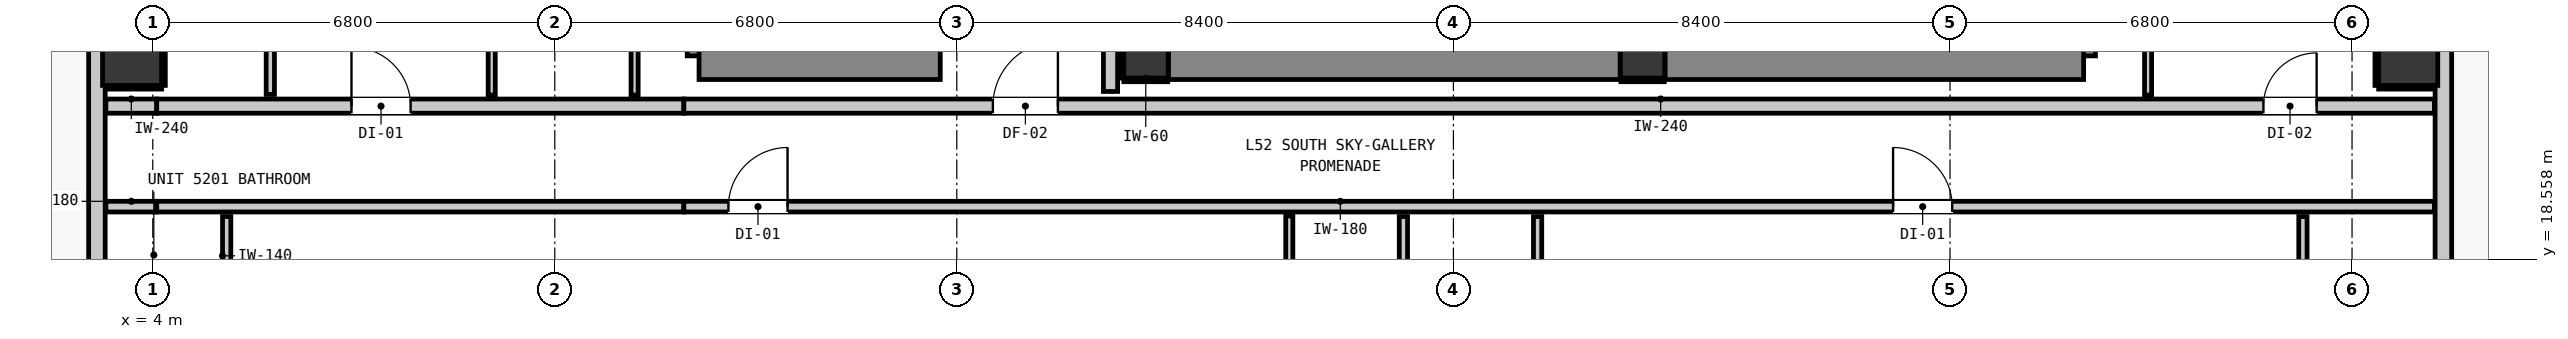
"""IFC4 building model, lengths in metres.
Left out: names, types, materials, properties, quantities, classifications, styles, units other than length and angle.
Written with IfcOpenShell. Run it as: python <this file> out.ifc"""

import sys

from ifc_helpers import new_model, si_unit, direction, frame, frame_2d, origin, origin_2d, place, context, subcontext, project, spatial, rectangle, extrude, element, fill, save


model = new_model("IFC4")
c1 = context("Model", 3, precision=1e-05, world=origin(), true_north=direction((0.0, 1.0)))
c2 = subcontext(c1, "Body", "Model", "MODEL_VIEW")
j1 = project(units=[si_unit("LENGTHUNIT", "METRE"), si_unit("PLANEANGLEUNIT", "RADIAN")], contexts=[c1])
p1 = place(None, origin())
s1 = spatial("IfcSite", under=j1, at=p1, CompositionType="ELEMENT")
p2 = place(p1, origin())
s2 = spatial("IfcBuilding", under=s1, at=p2, CompositionType="ELEMENT")
p3 = place(p2, frame((0.0, 0.0, 180.2)))
s3 = spatial("IfcBuildingStorey", under=s2, at=p3, CompositionType="ELEMENT", Elevation=180.2)
for number, where, z_axis, x_axis in (
    (1, (20.8, 22.0, 0.0), (0.0, 0.0, 1.0), (1.0, 0.0, 0.0)),
    (2, (29.2, 22.0, 0.0), (0.0, 0.0, 1.0), (1.0, 0.0, 0.0)),
):
    element("IfcColumn", number, at=place(p3, frame(where, z_axis=z_axis, x_axis=x_axis)), inside=s3, PredefinedType="COLUMN", context=c2, shape_type="SweptSolid", body=[
        extrude(rectangle(XDim=0.75, YDim=0.75, at=origin_2d()), origin(), (0.0, 0.0, 1.0), 3.32),
    ])
p4 = place(p3, frame((13.44, 22.0, 0.0), z_axis=(0.0, 0.0, 1.0), x_axis=(0.0, 1.0, 0.0)))
e3 = element("IfcWall", 3, at=p4, inside=s3, PredefinedType="SHEAR", context=c2, shape_type="SweptSolid", body=[
    extrude(rectangle(XDim=8.32, YDim=0.8, at=frame_2d((4.16, 0.0))), origin(), (0.0, 0.0, 1.0), 3.32),
])
p5 = place(p3, frame((13.24, 22.0, 0.0), z_axis=(0.0, 0.0, 1.0), x_axis=(1.0, 0.0, 0.0)))
e4 = element("IfcWall", 4, at=p5, inside=s3, PredefinedType="SHEAR", context=c2, shape_type="SweptSolid", body=[
    extrude(rectangle(XDim=4.08, YDim=0.8, at=frame_2d((2.04, 0.0))), origin(), (0.0, 0.0, 1.0), 3.32),
])
p6 = place(p3, frame((36.46, 22.0, 0.0), z_axis=(0.0, 0.0, 1.0), x_axis=(0.0, 1.0, 0.0)))
e5 = element("IfcWall", 5, at=p6, inside=s3, PredefinedType="SHEAR", context=c2, shape_type="SweptSolid", body=[
    extrude(rectangle(XDim=8.32, YDim=0.8, at=frame_2d((4.16, 0.0))), origin(), (0.0, 0.0, 1.0), 3.32),
])
p7 = place(p3, frame((29.58, 22.0, 0.0), z_axis=(0.0, 0.0, 1.0), x_axis=(1.0, 0.0, 0.0)))
e6 = element("IfcWall", 6, at=p7, inside=s3, PredefinedType="SHEAR", context=c2, shape_type="SweptSolid", body=[
    extrude(rectangle(XDim=7.08, YDim=0.8, at=frame_2d((3.54, 0.0))), origin(), (0.0, 0.0, 1.0), 3.32),
])
p8 = place(p3, frame((21.18, 22.0, 0.0), z_axis=(0.0, 0.0, 1.0), x_axis=(1.0, 0.0, 0.0)))
e7 = element("IfcWall", 7, at=p8, inside=s3, PredefinedType="SHEAR", context=c2, shape_type="SweptSolid", body=[
    extrude(rectangle(XDim=7.64, YDim=0.8, at=frame_2d((3.82, 0.0))), origin(), (0.0, 0.0, 1.0), 3.32),
])
for number, where, z_axis, x_axis in (
    (8, (3.65, 22.0, 0.0), (0.0, 0.0, 1.0), (1.0, 0.0, 0.0)),
    (9, (42.15, 22.0, 0.0), (0.0, 0.0, 1.0), (1.0, 0.0, 0.0)),
):
    element("IfcColumn", number, at=place(p3, frame(where, z_axis=z_axis, x_axis=x_axis)), inside=s3, PredefinedType="COLUMN", context=c2, shape_type="SweptSolid", body=[
        extrude(rectangle(XDim=1.0, YDim=1.0, at=origin_2d()), origin(), (0.0, 0.0, 1.0), 3.32),
    ])
p9 = place(p3, frame((3.055, 17.555, 0.0), z_axis=(0.0, 0.0, 1.0), x_axis=(0.0, 1.0, 0.0)))
e10 = element("IfcWall", 10, at=p9, inside=s3, PredefinedType="STANDARD", context=c2, shape_type="SweptSolid", body=[
    extrude(rectangle(XDim=32.29, YDim=0.28, at=frame_2d((16.145, 0.0))), origin(), (0.0, 0.0, 1.0), 3.08),
])
p10 = place(p9, frame((8.625, 0.0, 0.0)))
e11 = element("IfcOpeningElement", 11, at=p10, cuts=e10, PredefinedType="OPENING", context=c2, shape_type="SweptSolid", body=[
    extrude(rectangle(XDim=1.0, YDim=2.15, at=frame_2d((0.5, 1.075))), frame((0.0, 0.15, 0.0), z_axis=(0.0, -1.0, 0.0), x_axis=(1.0, 0.0, 0.0)), (0.0, 0.0, 1.0), 0.3),
])
p11 = place(p9, frame((30.322, 0.0, 0.85)))
e12 = element("IfcOpeningElement", 12, at=p11, cuts=e10, PredefinedType="OPENING", context=c2, shape_type="SweptSolid", body=[
    extrude(rectangle(XDim=0.9, YDim=1.5, at=frame_2d((0.45, 0.75))), frame((0.0, 0.15, 0.0), z_axis=(0.0, -1.0, 0.0), x_axis=(1.0, 0.0, 0.0)), (0.0, 0.0, 1.0), 0.3),
])
p12 = place(p9, frame((10.785, 0.0, 0.85)))
e13 = element("IfcOpeningElement", 13, at=p12, cuts=e10, PredefinedType="OPENING", context=c2, shape_type="SweptSolid", body=[
    extrude(rectangle(XDim=0.9, YDim=1.5, at=frame_2d((0.45, 0.75))), frame((0.0, 0.15, 0.0), z_axis=(0.0, -1.0, 0.0), x_axis=(1.0, 0.0, 0.0)), (0.0, 0.0, 1.0), 0.3),
])
p13 = place(p9, frame((17.045, 0.0, 0.85)))
e14 = element("IfcOpeningElement", 14, at=p13, cuts=e10, PredefinedType="OPENING", context=c2, shape_type="SweptSolid", body=[
    extrude(rectangle(XDim=0.9, YDim=1.5, at=frame_2d((0.45, 0.75))), frame((0.0, 0.15, 0.0), z_axis=(0.0, -1.0, 0.0), x_axis=(1.0, 0.0, 0.0)), (0.0, 0.0, 1.0), 0.3),
])
p14 = place(p3, frame((42.745, 49.845, 0.0), z_axis=(0.0, 0.0, 1.0), x_axis=(0.0, -1.0, 0.0)))
e15 = element("IfcWall", 15, at=p14, inside=s3, PredefinedType="STANDARD", context=c2, shape_type="SweptSolid", body=[
    extrude(rectangle(XDim=32.29, YDim=0.28, at=frame_2d((16.145, 0.0))), origin(), (0.0, 0.0, 1.0), 3.08),
])
p15 = place(p14, frame((0.904, 0.0, 0.0)))
e16 = element("IfcOpeningElement", 16, at=p15, cuts=e15, PredefinedType="OPENING", context=c2, shape_type="SweptSolid", body=[
    extrude(rectangle(XDim=1.0, YDim=2.15, at=frame_2d((0.5, 1.075))), frame((0.0, 0.15, 0.0), z_axis=(0.0, -1.0, 0.0), x_axis=(1.0, 0.0, 0.0)), (0.0, 0.0, 1.0), 0.3),
])
p16 = place(p14, frame((5.02, 0.0, 0.85)))
e17 = element("IfcOpeningElement", 17, at=p16, cuts=e15, PredefinedType="OPENING", context=c2, shape_type="SweptSolid", body=[
    extrude(rectangle(XDim=0.9, YDim=1.5, at=frame_2d((0.45, 0.75))), frame((0.0, 0.15, 0.0), z_axis=(0.0, -1.0, 0.0), x_axis=(1.0, 0.0, 0.0)), (0.0, 0.0, 1.0), 0.3),
])
p17 = place(p14, frame((23.045, 0.0, 0.85)))
e18 = element("IfcOpeningElement", 18, at=p17, cuts=e15, PredefinedType="OPENING", context=c2, shape_type="SweptSolid", body=[
    extrude(rectangle(XDim=0.9, YDim=1.5, at=frame_2d((0.45, 0.75))), frame((0.0, 0.15, 0.0), z_axis=(0.0, -1.0, 0.0), x_axis=(1.0, 0.0, 0.0)), (0.0, 0.0, 1.0), 0.3),
])
p18 = place(p14, frame((12.253, 0.0, 0.85)))
e19 = element("IfcOpeningElement", 19, at=p18, cuts=e15, PredefinedType="OPENING", context=c2, shape_type="SweptSolid", body=[
    extrude(rectangle(XDim=0.9, YDim=1.5, at=frame_2d((0.45, 0.75))), frame((0.0, 0.15, 0.0), z_axis=(0.0, -1.0, 0.0), x_axis=(1.0, 0.0, 0.0)), (0.0, 0.0, 1.0), 0.3),
])
p19 = place(p3, frame((3.207, 21.15, 0.0), z_axis=(0.0, 0.0, 1.0), x_axis=(1.0, 0.0, 0.0)))
e20 = element("IfcWall", 20, at=p19, inside=s3, PredefinedType="PARTITIONING", context=c2, shape_type="SweptSolid", body=[
    extrude(rectangle(XDim=0.86, YDim=0.24, at=frame_2d((0.43, 0.0))), origin(), (0.0, 0.0, 1.0), 3.08),
])
p20 = place(p3, frame((4.067, 21.15, 0.0), z_axis=(0.0, 0.0, 1.0), x_axis=(1.0, 0.0, 0.0)))
e21 = element("IfcWall", 21, at=p20, inside=s3, PredefinedType="PARTITIONING", context=c2, shape_type="SweptSolid", body=[
    extrude(rectangle(XDim=8.916, YDim=0.24, at=frame_2d((4.458, 0.0))), origin(), (0.0, 0.0, 1.0), 2.565),
])
p21 = place(p20, frame((3.294, 0.0, 0.0)))
e22 = element("IfcOpeningElement", 22, at=p21, cuts=e21, PredefinedType="OPENING", context=c2, shape_type="SweptSolid", body=[
    extrude(rectangle(XDim=1.0, YDim=2.15, at=frame_2d((0.5, 1.075))), frame((0.0, 0.13, 0.0), z_axis=(0.0, -1.0, 0.0), x_axis=(1.0, 0.0, 0.0)), (0.0, 0.0, 1.0), 0.26),
])
p22 = place(p3, frame((12.983, 21.15, 0.0), z_axis=(0.0, 0.0, 1.0), x_axis=(1.0, 0.0, 0.0)))
e23 = element("IfcWall", 23, at=p22, inside=s3, PredefinedType="PARTITIONING", context=c2, shape_type="SweptSolid", body=[
    extrude(rectangle(XDim=29.61, YDim=0.24, at=frame_2d((14.805, 0.0))), origin(), (0.0, 0.0, 1.0), 3.08),
])
p23 = place(p22, frame((5.227, 0.0, 0.0)))
e24 = element("IfcOpeningElement", 24, at=p23, cuts=e23, PredefinedType="OPENING", context=c2, shape_type="SweptSolid", body=[
    extrude(rectangle(XDim=1.1, YDim=2.15, at=frame_2d((0.55, 1.075))), frame((0.0, 0.13, 0.0), z_axis=(0.0, -1.0, 0.0), x_axis=(1.0, 0.0, 0.0)), (0.0, 0.0, 1.0), 0.26),
])
p24 = place(p22, frame((26.718, 0.0, 0.0)))
e25 = element("IfcOpeningElement", 25, at=p24, cuts=e23, PredefinedType="OPENING", context=c2, shape_type="SweptSolid", body=[
    extrude(rectangle(XDim=0.9, YDim=2.1, at=frame_2d((0.45, 1.05))), frame((0.0, 0.13, 0.0), z_axis=(0.0, -1.0, 0.0), x_axis=(1.0, 0.0, 0.0)), (0.0, 0.0, 1.0), 0.26),
])
p25 = place(p3, frame((3.207, 19.45, 0.0), z_axis=(0.0, 0.0, 1.0), x_axis=(1.0, 0.0, 0.0)))
e26 = element("IfcWall", 26, at=p25, inside=s3, PredefinedType="PARTITIONING", context=c2, shape_type="SweptSolid", body=[
    extrude(rectangle(XDim=0.86, YDim=0.18, at=frame_2d((0.43, 0.0))), origin(), (0.0, 0.0, 1.0), 3.08),
])
p26 = place(p3, frame((4.067, 19.45, 0.0), z_axis=(0.0, 0.0, 1.0), x_axis=(1.0, 0.0, 0.0)))
e27 = element("IfcWall", 27, at=p26, inside=s3, PredefinedType="PARTITIONING", context=c2, shape_type="SweptSolid", body=[
    extrude(rectangle(XDim=8.916, YDim=0.18, at=frame_2d((4.458, 0.0))), origin(), (0.0, 0.0, 1.0), 2.565),
])
p27 = place(p3, frame((12.983, 19.45, 0.0), z_axis=(0.0, 0.0, 1.0), x_axis=(1.0, 0.0, 0.0)))
e28 = element("IfcWall", 28, at=p27, inside=s3, PredefinedType="PARTITIONING", context=c2, shape_type="SweptSolid", body=[
    extrude(rectangle(XDim=29.61, YDim=0.18, at=frame_2d((14.805, 0.0))), origin(), (0.0, 0.0, 1.0), 3.08),
])
p28 = place(p27, frame((0.754, 0.0, 0.0)))
e29 = element("IfcOpeningElement", 29, at=p28, cuts=e28, PredefinedType="OPENING", context=c2, shape_type="SweptSolid", body=[
    extrude(rectangle(XDim=1.0, YDim=2.15, at=frame_2d((0.5, 1.075))), frame((0.0, 0.1, 0.0), z_axis=(0.0, -1.0, 0.0), x_axis=(1.0, 0.0, 0.0)), (0.0, 0.0, 1.0), 0.2),
])
p29 = place(p27, frame((20.454, 0.0, 0.0)))
e30 = element("IfcOpeningElement", 30, at=p29, cuts=e28, PredefinedType="OPENING", context=c2, shape_type="SweptSolid", body=[
    extrude(rectangle(XDim=1.0, YDim=2.15, at=frame_2d((0.5, 1.075))), frame((0.0, 0.1, 0.0), z_axis=(0.0, -1.0, 0.0), x_axis=(1.0, 0.0, 0.0)), (0.0, 0.0, 1.0), 0.2),
])
p30 = place(p3, frame((20.2, 21.398, 0.0), z_axis=(0.0, 0.0, 1.0), x_axis=(0.0, 1.0, 0.0)))
e31 = element("IfcWall", 31, at=p30, inside=s3, PredefinedType="PARTITIONING", context=c2, shape_type="SweptSolid", body=[
    extrude(rectangle(XDim=6.754, YDim=0.24, at=frame_2d((3.377, 0.0))), origin(), (0.0, 0.0, 1.0), 3.08),
])
p31 = place(p3, frame((5.25, 15.575, 0.0), z_axis=(0.0, 0.0, 1.0), x_axis=(0.0, 1.0, 0.0)))
e32 = element("IfcWall", 32, at=p31, inside=s3, PredefinedType="PARTITIONING", context=c2, shape_type="SweptSolid", body=[
    extrude(rectangle(XDim=3.707, YDim=0.14, at=frame_2d((1.854, 0.0))), origin(), (0.0, 0.0, 1.0), 3.08),
])
p32 = place(p31, frame((1.42, 0.0, 0.0)))
e33 = element("IfcOpeningElement", 33, at=p32, cuts=e32, PredefinedType="OPENING", context=c2, shape_type="SweptSolid", body=[
    extrude(rectangle(XDim=0.86, YDim=2.02, at=frame_2d((0.43, 1.01))), frame((0.0, 0.08, 0.0), z_axis=(0.0, -1.0, 0.0), x_axis=(1.0, 0.0, 0.0)), (0.0, 0.0, 1.0), 0.16),
])
p33 = place(p3, frame((5.988, 21.348, 0.0), z_axis=(0.0, 0.0, 1.0), x_axis=(0.0, 1.0, 0.0)))
e34 = element("IfcWall", 34, at=p33, inside=s3, PredefinedType="PARTITIONING", context=c2, shape_type="SweptSolid", body=[
    extrude(rectangle(XDim=4.004, YDim=0.14, at=frame_2d((2.002, 0.0))), origin(), (0.0, 0.0, 1.0), 3.08),
])
p34 = place(p33, frame((1.56, 0.0, 0.0)))
e35 = element("IfcOpeningElement", 35, at=p34, cuts=e34, PredefinedType="OPENING", context=c2, shape_type="SweptSolid", body=[
    extrude(rectangle(XDim=0.86, YDim=2.02, at=frame_2d((0.43, 1.01))), frame((0.0, 0.08, 0.0), z_axis=(0.0, -1.0, 0.0), x_axis=(1.0, 0.0, 0.0)), (0.0, 0.0, 1.0), 0.16),
])
p35 = place(p3, frame((25.154, 15.407, 0.0), z_axis=(0.0, 0.0, 1.0), x_axis=(0.0, 1.0, 0.0)))
e36 = element("IfcWall", 36, at=p35, inside=s3, PredefinedType="PARTITIONING", context=c2, shape_type="SweptSolid", body=[
    extrude(rectangle(XDim=3.875, YDim=0.14, at=frame_2d((1.938, 0.0))), origin(), (0.0, 0.0, 1.0), 3.08),
])
p36 = place(p3, frame((27.424, 15.407, 0.0), z_axis=(0.0, 0.0, 1.0), x_axis=(0.0, 1.0, 0.0)))
e37 = element("IfcWall", 37, at=p36, inside=s3, PredefinedType="PARTITIONING", context=c2, shape_type="SweptSolid", body=[
    extrude(rectangle(XDim=3.875, YDim=0.14, at=frame_2d((1.938, 0.0))), origin(), (0.0, 0.0, 1.0), 3.08),
])
p37 = place(p36, frame((1.588, 0.0, 0.0)))
e38 = element("IfcOpeningElement", 38, at=p37, cuts=e37, PredefinedType="OPENING", context=c2, shape_type="SweptSolid", body=[
    extrude(rectangle(XDim=0.86, YDim=2.02, at=frame_2d((0.43, 1.01))), frame((0.0, 0.08, 0.0), z_axis=(0.0, -1.0, 0.0), x_axis=(1.0, 0.0, 0.0)), (0.0, 0.0, 1.0), 0.16),
])
p38 = place(p3, frame((40.369, 15.407, 0.0), z_axis=(0.0, 0.0, 1.0), x_axis=(0.0, 1.0, 0.0)))
e39 = element("IfcWall", 39, at=p38, inside=s3, PredefinedType="PARTITIONING", context=c2, shape_type="SweptSolid", body=[
    extrude(rectangle(XDim=3.875, YDim=0.14, at=frame_2d((1.938, 0.0))), origin(), (0.0, 0.0, 1.0), 3.08),
])
p39 = place(p38, frame((1.568, 0.0, 0.0)))
e40 = element("IfcOpeningElement", 40, at=p39, cuts=e39, PredefinedType="OPENING", context=c2, shape_type="SweptSolid", body=[
    extrude(rectangle(XDim=0.9, YDim=2.1, at=frame_2d((0.45, 1.05))), frame((0.0, 0.08, 0.0), z_axis=(0.0, -1.0, 0.0), x_axis=(1.0, 0.0, 0.0)), (0.0, 0.0, 1.0), 0.16),
])
p40 = place(p3, frame((9.733, 21.338, 0.0), z_axis=(0.0, 0.0, 1.0), x_axis=(0.0, 1.0, 0.0)))
e41 = element("IfcWall", 41, at=p40, inside=s3, PredefinedType="PARTITIONING", context=c2, shape_type="SweptSolid", body=[
    extrude(rectangle(XDim=9.224, YDim=0.12, at=frame_2d((4.612, 0.0))), origin(), (0.0, 0.0, 1.0), 3.08),
])
p41 = place(p40, frame((4.137, 0.0, 0.0)))
e42 = element("IfcOpeningElement", 42, at=p41, cuts=e41, PredefinedType="OPENING", context=c2, shape_type="SweptSolid", body=[
    extrude(rectangle(XDim=0.9, YDim=2.1, at=frame_2d((0.45, 1.05))), frame((0.0, 0.07, 0.0), z_axis=(0.0, -1.0, 0.0), x_axis=(1.0, 0.0, 0.0)), (0.0, 0.0, 1.0), 0.14),
])
p42 = place(p3, frame((12.15, 21.338, 0.0), z_axis=(0.0, 0.0, 1.0), x_axis=(0.0, 1.0, 0.0)))
e43 = element("IfcWall", 43, at=p42, inside=s3, PredefinedType="PARTITIONING", context=c2, shape_type="SweptSolid", body=[
    extrude(rectangle(XDim=9.224, YDim=0.12, at=frame_2d((4.612, 0.0))), origin(), (0.0, 0.0, 1.0), 3.08),
])
p43 = place(p3, frame((23.224, 15.407, 0.0), z_axis=(0.0, 0.0, 1.0), x_axis=(0.0, 1.0, 0.0)))
e44 = element("IfcWall", 44, at=p43, inside=s3, PredefinedType="PARTITIONING", context=c2, shape_type="SweptSolid", body=[
    extrude(rectangle(XDim=3.885, YDim=0.12, at=frame_2d((1.942, 0.0))), origin(), (0.0, 0.0, 1.0), 3.08),
])
p44 = place(p43, frame((1.568, 0.0, 0.0)))
e45 = element("IfcOpeningElement", 45, at=p44, cuts=e44, PredefinedType="OPENING", context=c2, shape_type="SweptSolid", body=[
    extrude(rectangle(XDim=0.9, YDim=2.1, at=frame_2d((0.45, 1.05))), frame((0.0, 0.07, 0.0), z_axis=(0.0, -1.0, 0.0), x_axis=(1.0, 0.0, 0.0)), (0.0, 0.0, 1.0), 0.14),
])
p45 = place(p3, frame((37.75, 21.338, 0.0), z_axis=(0.0, 0.0, 1.0), x_axis=(0.0, 1.0, 0.0)))
e46 = element("IfcWall", 46, at=p45, inside=s3, PredefinedType="PARTITIONING", context=c2, shape_type="SweptSolid", body=[
    extrude(rectangle(XDim=9.224, YDim=0.12, at=frame_2d((4.612, 0.0))), origin(), (0.0, 0.0, 1.0), 3.08),
])
p46 = place(p3, frame((20.425, 21.593, 0.0), z_axis=(0.0, 0.0, 1.0), x_axis=(1.0, 0.0, 0.0)))
e47 = element("IfcWall", 47, at=p46, inside=s3, PredefinedType="PARTITIONING", context=c2, shape_type="SweptSolid", body=[
    extrude(rectangle(XDim=0.742, YDim=0.06, at=frame_2d((0.371, 0.0))), origin(), (0.0, 0.0, 1.0), 1.45),
])
p47 = place(p3, frame((20.393, 21.625, 0.0), z_axis=(0.0, 0.0, 1.0), x_axis=(0.0, 1.0, 0.0)))
e48 = element("IfcWall", 48, at=p47, inside=s3, PredefinedType="PARTITIONING", context=c2, shape_type="SweptSolid", body=[
    extrude(rectangle(XDim=0.75, YDim=0.06, at=frame_2d((0.375, 0.0))), origin(), (0.0, 0.0, 1.0), 1.45),
])
p48 = place(p3, frame((28.833, 21.593, 0.0), z_axis=(0.0, 0.0, 1.0), x_axis=(1.0, 0.0, 0.0)))
e49 = element("IfcWall", 49, at=p48, inside=s3, PredefinedType="PARTITIONING", context=c2, shape_type="SweptSolid", body=[
    extrude(rectangle(XDim=0.734, YDim=0.06, at=frame_2d((0.367, 0.0))), origin(), (0.0, 0.0, 1.0), 1.45),
])
p49 = place(p3, frame((3.21, 21.468, 0.0), z_axis=(0.0, 0.0, 1.0), x_axis=(1.0, 0.0, 0.0)))
e50 = element("IfcWall", 50, at=p49, inside=s3, PredefinedType="PARTITIONING", context=c2, shape_type="SweptSolid", body=[
    extrude(rectangle(XDim=0.94, YDim=0.06, at=frame_2d((0.47, 0.0))), origin(), (0.0, 0.0, 1.0), 1.45),
])
p50 = place(p3, frame((4.182, 21.5, 0.0), z_axis=(0.0, 0.0, 1.0), x_axis=(0.0, 1.0, 0.0)))
e51 = element("IfcWall", 51, at=p50, inside=s3, PredefinedType="PARTITIONING", context=c2, shape_type="SweptSolid", body=[
    extrude(rectangle(XDim=1.0, YDim=0.06, at=frame_2d((0.5, 0.0))), origin(), (0.0, 0.0, 1.0), 1.45),
])
p51 = place(p3, frame((41.65, 21.468, 0.0), z_axis=(0.0, 0.0, 1.0), x_axis=(1.0, 0.0, 0.0)))
e52 = element("IfcWall", 52, at=p51, inside=s3, PredefinedType="PARTITIONING", context=c2, shape_type="SweptSolid", body=[
    extrude(rectangle(XDim=0.94, YDim=0.06, at=frame_2d((0.47, 0.0))), origin(), (0.0, 0.0, 1.0), 1.45),
])
p52 = place(p3, frame((41.618, 21.5, 0.0), z_axis=(0.0, 0.0, 1.0), x_axis=(0.0, 1.0, 0.0)))
e53 = element("IfcWall", 53, at=p52, inside=s3, PredefinedType="PARTITIONING", context=c2, shape_type="SweptSolid", body=[
    extrude(rectangle(XDim=1.0, YDim=0.06, at=frame_2d((0.5, 0.0))), origin(), (0.0, 0.0, 1.0), 1.45),
])
p53 = place(p23, origin())
e54 = element("IfcDoor", 54, at=p53, inside=s3, OperationType="SINGLE_SWING_RIGHT", PredefinedType="DOOR", context=c2, shape_type="SweptSolid", body=[
    extrude(rectangle(XDim=1.1, YDim=2.15, at=frame_2d((0.55, 1.075))), frame((0.0, 0.025, 0.0), z_axis=(0.0, -1.0, 0.0), x_axis=(1.0, 0.0, 0.0)), (0.0, 0.0, 1.0), 0.05),
])
fill(e24, e54)
p54 = place(p28, origin())
e55 = element("IfcDoor", 55, at=p54, inside=s3, OperationType="SINGLE_SWING_RIGHT", PredefinedType="DOOR", context=c2, shape_type="SweptSolid", body=[
    extrude(rectangle(XDim=1.0, YDim=2.15, at=frame_2d((0.5, 1.075))), frame((0.0, 0.025, 0.0), z_axis=(0.0, -1.0, 0.0), x_axis=(1.0, 0.0, 0.0)), (0.0, 0.0, 1.0), 0.05),
])
fill(e29, e55)
p55 = place(p29, origin())
e56 = element("IfcDoor", 56, at=p55, inside=s3, OperationType="SINGLE_SWING_LEFT", PredefinedType="DOOR", context=c2, shape_type="SweptSolid", body=[
    extrude(rectangle(XDim=1.0, YDim=2.15, at=frame_2d((0.5, 1.075))), frame((0.0, 0.025, 0.0), z_axis=(0.0, -1.0, 0.0), x_axis=(1.0, 0.0, 0.0)), (0.0, 0.0, 1.0), 0.05),
])
fill(e30, e56)
p56 = place(p21, origin())
e57 = element("IfcDoor", 57, at=p56, inside=s3, OperationType="SINGLE_SWING_LEFT", PredefinedType="DOOR", context=c2, shape_type="SweptSolid", body=[
    extrude(rectangle(XDim=1.0, YDim=2.15, at=frame_2d((0.5, 1.075))), frame((0.0, 0.025, 0.0), z_axis=(0.0, -1.0, 0.0), x_axis=(1.0, 0.0, 0.0)), (0.0, 0.0, 1.0), 0.05),
])
fill(e22, e57)
p57 = place(p24, origin())
e58 = element("IfcDoor", 58, at=p57, inside=s3, OperationType="SINGLE_SWING_RIGHT", PredefinedType="DOOR", context=c2, shape_type="SweptSolid", body=[
    extrude(rectangle(XDim=0.9, YDim=2.1, at=frame_2d((0.45, 1.05))), frame((0.0, 0.025, 0.0), z_axis=(0.0, -1.0, 0.0), x_axis=(1.0, 0.0, 0.0)), (0.0, 0.0, 1.0), 0.05),
])
fill(e25, e58)
save(model, sys.argv[1])
